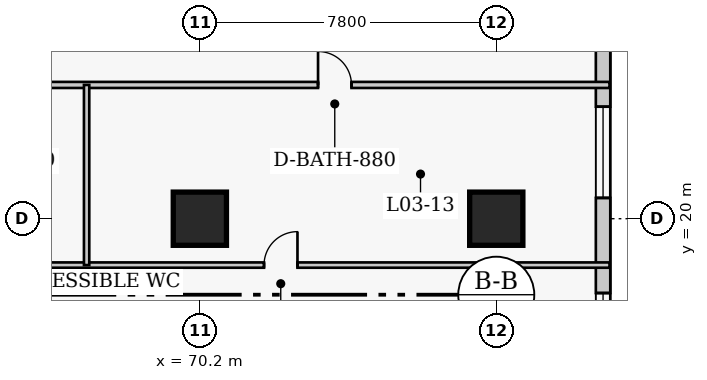
"""IFC4 building model, lengths in metres.
Left out: names, types, materials, properties, quantities, classifications, styles, units other than length and angle.
Written with IfcOpenShell. Run it as: python <this file> out.ifc"""

import sys

from ifc_helpers import new_model, si_unit, direction, frame, frame_2d, origin, origin_2d, place, context, subcontext, project, spatial, rectangle, extrude, element, fill, save


model = new_model("IFC4")
c1 = context("Model", 3, precision=1e-05, world=origin(), true_north=direction((0.0, 1.0)))
c2 = subcontext(c1, "Body", "Model", "MODEL_VIEW")
j1 = project(units=[si_unit("LENGTHUNIT", "METRE"), si_unit("PLANEANGLEUNIT", "RADIAN")], contexts=[c1])
p1 = place(None, origin())
s1 = spatial("IfcSite", under=j1, at=p1, CompositionType="ELEMENT")
p2 = place(p1, origin())
s2 = spatial("IfcBuilding", under=s1, at=p2, CompositionType="ELEMENT")
p3 = place(p2, frame((0.0, 0.0, 15.8)))
s3 = spatial("IfcBuildingStorey", under=s2, at=p3, CompositionType="ELEMENT", Elevation=15.8)
for number, where, z_axis, x_axis in (
    (1, (70.2, 20.0, 0.0), (0.0, 0.0, 1.0), (1.0, 0.0, 0.0)),
    (2, (78.0, 20.0, 0.0), (0.0, 0.0, 1.0), (1.0, 0.0, 0.0)),
):
    element("IfcColumn", number, at=place(p3, frame(where, z_axis=z_axis, x_axis=x_axis)), inside=s3, PredefinedType="COLUMN", context=c2, shape_type="SweptSolid", body=[
        extrude(rectangle(XDim=1.4, YDim=1.4, at=origin_2d()), origin(), (0.0, 0.0, 1.0), 5.0),
    ])
p4 = place(p3, frame((80.81, 2.61, 0.0), z_axis=(0.0, 0.0, 1.0), x_axis=(0.0, 1.0, 0.0)))
e3 = element("IfcWall", 3, at=p4, inside=s3, PredefinedType="SOLIDWALL", context=c2, shape_type="SweptSolid", body=[
    extrude(rectangle(XDim=46.78, YDim=0.38, at=frame_2d((23.39, 0.0))), origin(), (0.0, 0.0, 1.0), 4.58),
])
p5 = place(p4, frame((0.927, 0.0, 0.75)))
e4 = element("IfcOpeningElement", 4, at=p5, cuts=e3, PredefinedType="OPENING", context=c2, shape_type="SweptSolid", body=[
    extrude(rectangle(XDim=2.4, YDim=2.2, at=frame_2d((1.2, 1.1))), frame((0.0, 0.2, 0.0), z_axis=(0.0, -1.0, 0.0), x_axis=(1.0, 0.0, 0.0)), (0.0, 0.0, 1.0), 0.4),
])
p6 = place(p4, frame((5.179, 0.0, 0.75)))
e5 = element("IfcOpeningElement", 5, at=p6, cuts=e3, PredefinedType="OPENING", context=c2, shape_type="SweptSolid", body=[
    extrude(rectangle(XDim=2.4, YDim=2.2, at=frame_2d((1.2, 1.1))), frame((0.0, 0.2, 0.0), z_axis=(0.0, -1.0, 0.0), x_axis=(1.0, 0.0, 0.0)), (0.0, 0.0, 1.0), 0.4),
])
p7 = place(p4, frame((9.432, 0.0, 0.75)))
e6 = element("IfcOpeningElement", 6, at=p7, cuts=e3, PredefinedType="OPENING", context=c2, shape_type="SweptSolid", body=[
    extrude(rectangle(XDim=2.4, YDim=2.2, at=frame_2d((1.2, 1.1))), frame((0.0, 0.2, 0.0), z_axis=(0.0, -1.0, 0.0), x_axis=(1.0, 0.0, 0.0)), (0.0, 0.0, 1.0), 0.4),
])
p8 = place(p4, frame((13.034, 0.0, 0.75)))
e7 = element("IfcOpeningElement", 7, at=p8, cuts=e3, PredefinedType="OPENING", context=c2, shape_type="SweptSolid", body=[
    extrude(rectangle(XDim=2.4, YDim=2.2, at=frame_2d((1.2, 1.1))), frame((0.0, 0.2, 0.0), z_axis=(0.0, -1.0, 0.0), x_axis=(1.0, 0.0, 0.0)), (0.0, 0.0, 1.0), 0.4),
])
p9 = place(p4, frame((17.937, 0.0, 0.75)))
e8 = element("IfcOpeningElement", 8, at=p9, cuts=e3, PredefinedType="OPENING", context=c2, shape_type="SweptSolid", body=[
    extrude(rectangle(XDim=2.4, YDim=2.2, at=frame_2d((1.2, 1.1))), frame((0.0, 0.2, 0.0), z_axis=(0.0, -1.0, 0.0), x_axis=(1.0, 0.0, 0.0)), (0.0, 0.0, 1.0), 0.4),
])
p10 = place(p4, frame((26.443, 0.0, 0.75)))
e9 = element("IfcOpeningElement", 9, at=p10, cuts=e3, PredefinedType="OPENING", context=c2, shape_type="SweptSolid", body=[
    extrude(rectangle(XDim=2.4, YDim=2.2, at=frame_2d((1.2, 1.1))), frame((0.0, 0.2, 0.0), z_axis=(0.0, -1.0, 0.0), x_axis=(1.0, 0.0, 0.0)), (0.0, 0.0, 1.0), 0.4),
])
p11 = place(p4, frame((30.696, 0.0, 0.75)))
e10 = element("IfcOpeningElement", 10, at=p11, cuts=e3, PredefinedType="OPENING", context=c2, shape_type="SweptSolid", body=[
    extrude(rectangle(XDim=2.4, YDim=2.2, at=frame_2d((1.2, 1.1))), frame((0.0, 0.2, 0.0), z_axis=(0.0, -1.0, 0.0), x_axis=(1.0, 0.0, 0.0)), (0.0, 0.0, 1.0), 0.4),
])
p12 = place(p4, frame((34.948, 0.0, 0.75)))
e11 = element("IfcOpeningElement", 11, at=p12, cuts=e3, PredefinedType="OPENING", context=c2, shape_type="SweptSolid", body=[
    extrude(rectangle(XDim=2.4, YDim=2.2, at=frame_2d((1.2, 1.1))), frame((0.0, 0.2, 0.0), z_axis=(0.0, -1.0, 0.0), x_axis=(1.0, 0.0, 0.0)), (0.0, 0.0, 1.0), 0.4),
])
p13 = place(p4, frame((39.201, 0.0, 0.75)))
e12 = element("IfcOpeningElement", 12, at=p13, cuts=e3, PredefinedType="OPENING", context=c2, shape_type="SweptSolid", body=[
    extrude(rectangle(XDim=2.4, YDim=2.2, at=frame_2d((1.2, 1.1))), frame((0.0, 0.2, 0.0), z_axis=(0.0, -1.0, 0.0), x_axis=(1.0, 0.0, 0.0)), (0.0, 0.0, 1.0), 0.4),
])
p14 = place(p4, frame((43.454, 0.0, 0.75)))
e13 = element("IfcOpeningElement", 13, at=p14, cuts=e3, PredefinedType="OPENING", context=c2, shape_type="SweptSolid", body=[
    extrude(rectangle(XDim=2.4, YDim=2.2, at=frame_2d((1.2, 1.1))), frame((0.0, 0.2, 0.0), z_axis=(0.0, -1.0, 0.0), x_axis=(1.0, 0.0, 0.0)), (0.0, 0.0, 1.0), 0.4),
])
p15 = place(p3, frame((-2.98, 23.52, 0.0), z_axis=(0.0, 0.0, 1.0), x_axis=(1.0, 0.0, 0.0)))
e14 = element("IfcWall", 14, at=p15, inside=s3, PredefinedType="PARTITIONING", context=c2, shape_type="SweptSolid", body=[
    extrude(rectangle(XDim=83.96, YDim=0.16, at=frame_2d((41.98, 0.0))), origin(), (0.0, 0.0, 1.0), 4.58),
])
p16 = place(p15, frame((7.13, 0.0, 0.0)))
e15 = element("IfcOpeningElement", 15, at=p16, cuts=e14, PredefinedType="OPENING", context=c2, shape_type="SweptSolid", body=[
    extrude(rectangle(XDim=1.0, YDim=2.15, at=frame_2d((0.5, 1.075))), frame((0.0, 0.09, 0.0), z_axis=(0.0, -1.0, 0.0), x_axis=(1.0, 0.0, 0.0)), (0.0, 0.0, 1.0), 0.18),
])
p17 = place(p15, frame((11.96, 0.0, 0.0)))
e16 = element("IfcOpeningElement", 16, at=p17, cuts=e14, PredefinedType="OPENING", context=c2, shape_type="SweptSolid", body=[
    extrude(rectangle(XDim=1.1, YDim=2.15, at=frame_2d((0.55, 1.075))), frame((0.0, 0.09, 0.0), z_axis=(0.0, -1.0, 0.0), x_axis=(1.0, 0.0, 0.0)), (0.0, 0.0, 1.0), 0.18),
])
p18 = place(p15, frame((15.205, 0.0, 0.0)))
e17 = element("IfcOpeningElement", 17, at=p18, cuts=e14, PredefinedType="OPENING", context=c2, shape_type="SweptSolid", body=[
    extrude(rectangle(XDim=0.95, YDim=2.1, at=frame_2d((0.475, 1.05))), frame((0.0, 0.09, 0.0), z_axis=(0.0, -1.0, 0.0), x_axis=(1.0, 0.0, 0.0)), (0.0, 0.0, 1.0), 0.18),
])
p19 = place(p15, frame((26.88, 0.0, 0.0)))
e18 = element("IfcOpeningElement", 18, at=p19, cuts=e14, PredefinedType="OPENING", context=c2, shape_type="SweptSolid", body=[
    extrude(rectangle(XDim=2.2, YDim=2.4, at=frame_2d((1.1, 1.2))), frame((0.0, 0.09, 0.0), z_axis=(0.0, -1.0, 0.0), x_axis=(1.0, 0.0, 0.0)), (0.0, 0.0, 1.0), 0.18),
])
p20 = place(p15, frame((37.88, 0.0, 0.0)))
e19 = element("IfcOpeningElement", 19, at=p20, cuts=e14, PredefinedType="OPENING", context=c2, shape_type="SweptSolid", body=[
    extrude(rectangle(XDim=2.2, YDim=2.4, at=frame_2d((1.1, 1.2))), frame((0.0, 0.09, 0.0), z_axis=(0.0, -1.0, 0.0), x_axis=(1.0, 0.0, 0.0)), (0.0, 0.0, 1.0), 0.18),
])
p21 = place(p15, frame((48.63, 0.0, 0.0)))
e20 = element("IfcOpeningElement", 20, at=p21, cuts=e14, PredefinedType="OPENING", context=c2, shape_type="SweptSolid", body=[
    extrude(rectangle(XDim=2.2, YDim=2.4, at=frame_2d((1.1, 1.2))), frame((0.0, 0.09, 0.0), z_axis=(0.0, -1.0, 0.0), x_axis=(1.0, 0.0, 0.0)), (0.0, 0.0, 1.0), 0.18),
])
p22 = place(p15, frame((59.08, 0.0, 0.0)))
e21 = element("IfcOpeningElement", 21, at=p22, cuts=e14, PredefinedType="OPENING", context=c2, shape_type="SweptSolid", body=[
    extrude(rectangle(XDim=2.2, YDim=2.4, at=frame_2d((1.1, 1.2))), frame((0.0, 0.09, 0.0), z_axis=(0.0, -1.0, 0.0), x_axis=(1.0, 0.0, 0.0)), (0.0, 0.0, 1.0), 0.18),
])
p23 = place(p15, frame((67.34, 0.0, 0.0)))
e22 = element("IfcOpeningElement", 22, at=p23, cuts=e14, PredefinedType="OPENING", context=c2, shape_type="SweptSolid", body=[
    extrude(rectangle(XDim=0.88, YDim=2.05, at=frame_2d((0.44, 1.025))), frame((0.0, 0.09, 0.0), z_axis=(0.0, -1.0, 0.0), x_axis=(1.0, 0.0, 0.0)), (0.0, 0.0, 1.0), 0.18),
])
p24 = place(p15, frame((76.29, 0.0, 0.0)))
e23 = element("IfcOpeningElement", 23, at=p24, cuts=e14, PredefinedType="OPENING", context=c2, shape_type="SweptSolid", body=[
    extrude(rectangle(XDim=0.88, YDim=2.05, at=frame_2d((0.44, 1.025))), frame((0.0, 0.09, 0.0), z_axis=(0.0, -1.0, 0.0), x_axis=(1.0, 0.0, 0.0)), (0.0, 0.0, 1.0), 0.18),
])
p25 = place(p3, frame((62.4, 18.78, 0.0), z_axis=(0.0, 0.0, 1.0), x_axis=(1.0, 0.0, 0.0)))
e24 = element("IfcWall", 24, at=p25, inside=s3, PredefinedType="PLUMBINGWALL", context=c2, shape_type="SweptSolid", body=[
    extrude(rectangle(XDim=18.58, YDim=0.14, at=frame_2d((9.29, 0.0))), origin(), (0.0, 0.0, 1.0), 4.58),
])
p26 = place(p25, frame((9.489, 0.0, 0.0)))
e25 = element("IfcOpeningElement", 25, at=p26, cuts=e24, PredefinedType="OPENING", context=c2, shape_type="SweptSolid", body=[
    extrude(rectangle(XDim=0.88, YDim=2.05, at=frame_2d((0.44, 1.025))), frame((0.0, 0.08, 0.0), z_axis=(0.0, -1.0, 0.0), x_axis=(1.0, 0.0, 0.0)), (0.0, 0.0, 1.0), 0.16),
])
p27 = place(p3, frame((67.22, 18.78, 0.0), z_axis=(0.0, 0.0, 1.0), x_axis=(0.0, 1.0, 0.0)))
e26 = element("IfcWall", 26, at=p27, inside=s3, PredefinedType="PLUMBINGWALL", context=c2, shape_type="SweptSolid", body=[
    extrude(rectangle(XDim=4.74, YDim=0.14, at=frame_2d((2.37, 0.0))), origin(), (0.0, 0.0, 1.0), 4.58),
])
p28 = place(p8, origin())
e27 = element("IfcWindow", 27, at=p28, inside=s3, PartitioningType="SINGLE_PANEL", PredefinedType="WINDOW", context=c2, shape_type="SweptSolid", body=[
    extrude(rectangle(XDim=2.4, YDim=2.2, at=frame_2d((1.2, 1.1))), frame((0.0, 0.03, 0.0), z_axis=(0.0, -1.0, 0.0), x_axis=(1.0, 0.0, 0.0)), (0.0, 0.0, 1.0), 0.06),
])
fill(e7, e27)
p29 = place(p9, origin())
e28 = element("IfcWindow", 28, at=p29, inside=s3, PartitioningType="SINGLE_PANEL", PredefinedType="WINDOW", context=c2, shape_type="SweptSolid", body=[
    extrude(rectangle(XDim=2.4, YDim=2.2, at=frame_2d((1.2, 1.1))), frame((0.0, 0.03, 0.0), z_axis=(0.0, -1.0, 0.0), x_axis=(1.0, 0.0, 0.0)), (0.0, 0.0, 1.0), 0.06),
])
fill(e8, e28)
p30 = place(p24, origin())
e29 = element("IfcDoor", 29, at=p30, inside=s3, OperationType="SINGLE_SWING_LEFT", PredefinedType="DOOR", context=c2, shape_type="SweptSolid", body=[
    extrude(rectangle(XDim=0.88, YDim=2.05, at=frame_2d((0.44, 1.025))), frame((0.0, 0.025, 0.0), z_axis=(0.0, -1.0, 0.0), x_axis=(1.0, 0.0, 0.0)), (0.0, 0.0, 1.0), 0.05),
])
fill(e23, e29)
p31 = place(p26, origin())
e30 = element("IfcDoor", 30, at=p31, inside=s3, OperationType="SINGLE_SWING_RIGHT", PredefinedType="DOOR", context=c2, shape_type="SweptSolid", body=[
    extrude(rectangle(XDim=0.88, YDim=2.05, at=frame_2d((0.44, 1.025))), frame((0.0, 0.025, 0.0), z_axis=(0.0, -1.0, 0.0), x_axis=(1.0, 0.0, 0.0)), (0.0, 0.0, 1.0), 0.05),
])
fill(e25, e30)
save(model, sys.argv[1])
